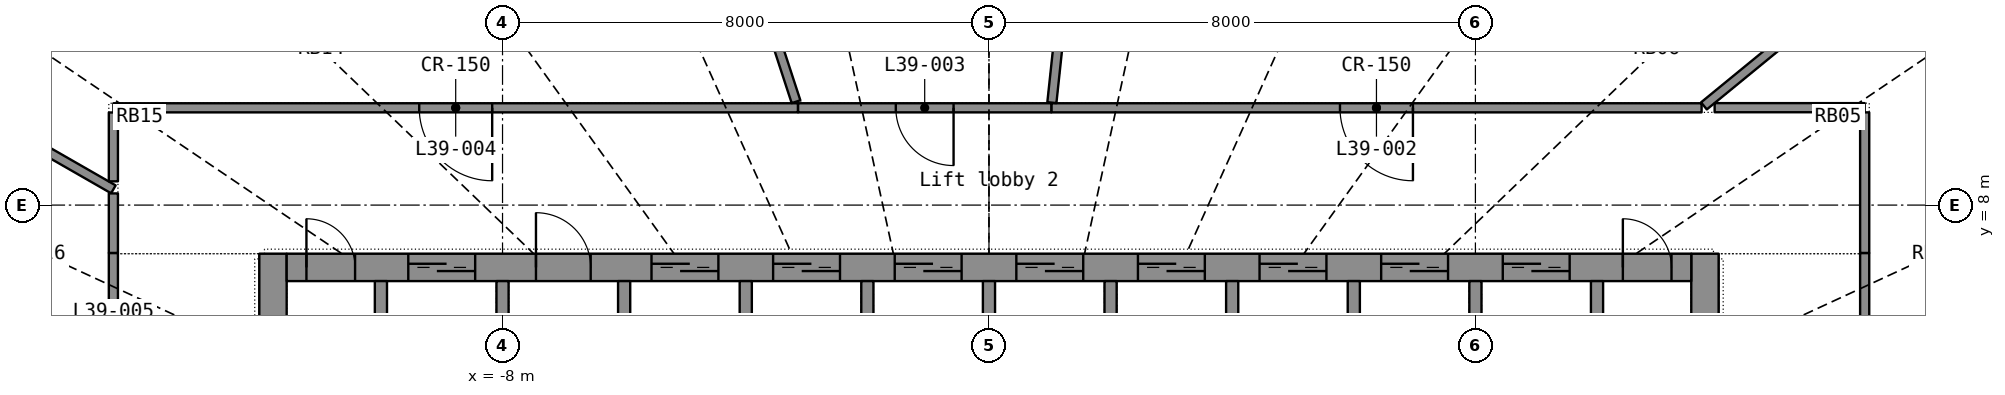
"""IFC4 building model, lengths in metres.
Left out: names, types, materials, properties, quantities, classifications, styles, units other than length and angle.
Written with IfcOpenShell. Run it as: python <this file> out.ifc"""

import sys

from ifc_helpers import new_model, si_unit, direction, frame, frame_2d, origin, place, context, subcontext, project, spatial, rectangle, extrude, element, fill, save


model = new_model("IFC4")
c1 = context("Model", 3, precision=1e-05, world=origin(), true_north=direction((0.0, 1.0)))
c2 = subcontext(c1, "Body", "Model", "MODEL_VIEW")
j1 = project(units=[si_unit("LENGTHUNIT", "METRE"), si_unit("PLANEANGLEUNIT", "RADIAN")], contexts=[c1])
p1 = place(None, origin())
s1 = spatial("IfcSite", under=j1, at=p1, CompositionType="ELEMENT")
p2 = place(p1, origin())
s2 = spatial("IfcBuilding", under=s1, at=p2, CompositionType="ELEMENT")
p3 = place(p2, frame((0.0, 0.0, 164.5)))
s3 = spatial("IfcBuildingStorey", under=s2, at=p3, CompositionType="ELEMENT", Elevation=164.5)
p4 = place(p3, frame((-11.775, -7.2, 0.0), z_axis=(0.0, 0.0, 1.0), x_axis=(0.0, 1.0, 0.0)))
e1 = element("IfcWall", 1, at=p4, inside=s3, PredefinedType="SHEAR", context=c2, shape_type="SweptSolid", body=[
    extrude(rectangle(XDim=14.4, YDim=0.45, at=frame_2d((7.2, 0.0))), origin(), (0.0, 0.0, 1.0), 3.3),
])
p5 = place(p4, frame((6.5, 0.0, 0.0)))
e2 = element("IfcOpeningElement", 2, at=p5, cuts=e1, PredefinedType="OPENING", context=c2, shape_type="SweptSolid", body=[
    extrude(rectangle(XDim=1.4, YDim=2.2, at=frame_2d((0.7, 1.1))), frame((0.0, 0.235, 0.0), z_axis=(0.0, -1.0, 0.0), x_axis=(1.0, 0.0, 0.0)), (0.0, 0.0, 1.0), 0.47),
])
p6 = place(p3, frame((11.775, -7.2, 0.0), z_axis=(0.0, 0.0, 1.0), x_axis=(0.0, 1.0, 0.0)))
e3 = element("IfcWall", 3, at=p6, inside=s3, PredefinedType="SHEAR", context=c2, shape_type="SweptSolid", body=[
    extrude(rectangle(XDim=14.4, YDim=0.45, at=frame_2d((7.2, 0.0))), origin(), (0.0, 0.0, 1.0), 3.3),
])
p7 = place(p6, frame((6.5, 0.0, 0.0)))
e4 = element("IfcOpeningElement", 4, at=p7, cuts=e3, PredefinedType="OPENING", context=c2, shape_type="SweptSolid", body=[
    extrude(rectangle(XDim=1.4, YDim=2.2, at=frame_2d((0.7, 1.1))), frame((0.0, 0.235, 0.0), z_axis=(0.0, -1.0, 0.0), x_axis=(1.0, 0.0, 0.0)), (0.0, 0.0, 1.0), 0.47),
])
p8 = place(p3, frame((-11.55, 6.975, 0.0), z_axis=(0.0, 0.0, 1.0), x_axis=(1.0, 0.0, 0.0)))
e5 = element("IfcWall", 5, at=p8, inside=s3, PredefinedType="SHEAR", context=c2, shape_type="SweptSolid", body=[
    extrude(rectangle(XDim=23.1, YDim=0.45, at=frame_2d((11.55, 0.0))), origin(), (0.0, 0.0, 1.0), 3.3),
])
p9 = place(p8, frame((2.0, 0.0, 0.0)))
e6 = element("IfcOpeningElement", 6, at=p9, cuts=e5, PredefinedType="OPENING", context=c2, shape_type="SweptSolid", body=[
    extrude(rectangle(XDim=1.1, YDim=2.2, at=frame_2d((0.55, 1.1))), frame((0.0, 0.235, 0.0), z_axis=(0.0, -1.0, 0.0), x_axis=(1.0, 0.0, 0.0)), (0.0, 0.0, 1.0), 0.47),
])
p10 = place(p8, frame((6.0, 0.0, 0.0)))
e7 = element("IfcOpeningElement", 7, at=p10, cuts=e5, PredefinedType="OPENING", context=c2, shape_type="SweptSolid", body=[
    extrude(rectangle(XDim=1.1, YDim=2.2, at=frame_2d((0.55, 1.1))), frame((0.0, 0.235, 0.0), z_axis=(0.0, -1.0, 0.0), x_axis=(1.0, 0.0, 0.0)), (0.0, 0.0, 1.0), 0.47),
])
p11 = place(p8, frame((8.0, 0.0, 0.0)))
e8 = element("IfcOpeningElement", 8, at=p11, cuts=e5, PredefinedType="OPENING", context=c2, shape_type="SweptSolid", body=[
    extrude(rectangle(XDim=1.1, YDim=2.2, at=frame_2d((0.55, 1.1))), frame((0.0, 0.235, 0.0), z_axis=(0.0, -1.0, 0.0), x_axis=(1.0, 0.0, 0.0)), (0.0, 0.0, 1.0), 0.47),
])
p12 = place(p8, frame((10.0, 0.0, 0.0)))
e9 = element("IfcOpeningElement", 9, at=p12, cuts=e5, PredefinedType="OPENING", context=c2, shape_type="SweptSolid", body=[
    extrude(rectangle(XDim=1.1, YDim=2.2, at=frame_2d((0.55, 1.1))), frame((0.0, 0.235, 0.0), z_axis=(0.0, -1.0, 0.0), x_axis=(1.0, 0.0, 0.0)), (0.0, 0.0, 1.0), 0.47),
])
p13 = place(p8, frame((12.0, 0.0, 0.0)))
e10 = element("IfcOpeningElement", 10, at=p13, cuts=e5, PredefinedType="OPENING", context=c2, shape_type="SweptSolid", body=[
    extrude(rectangle(XDim=1.1, YDim=2.2, at=frame_2d((0.55, 1.1))), frame((0.0, 0.235, 0.0), z_axis=(0.0, -1.0, 0.0), x_axis=(1.0, 0.0, 0.0)), (0.0, 0.0, 1.0), 0.47),
])
p14 = place(p8, frame((14.0, 0.0, 0.0)))
e11 = element("IfcOpeningElement", 11, at=p14, cuts=e5, PredefinedType="OPENING", context=c2, shape_type="SweptSolid", body=[
    extrude(rectangle(XDim=1.1, YDim=2.2, at=frame_2d((0.55, 1.1))), frame((0.0, 0.235, 0.0), z_axis=(0.0, -1.0, 0.0), x_axis=(1.0, 0.0, 0.0)), (0.0, 0.0, 1.0), 0.47),
])
p15 = place(p8, frame((16.0, 0.0, 0.0)))
e12 = element("IfcOpeningElement", 12, at=p15, cuts=e5, PredefinedType="OPENING", context=c2, shape_type="SweptSolid", body=[
    extrude(rectangle(XDim=1.1, YDim=2.2, at=frame_2d((0.55, 1.1))), frame((0.0, 0.235, 0.0), z_axis=(0.0, -1.0, 0.0), x_axis=(1.0, 0.0, 0.0)), (0.0, 0.0, 1.0), 0.47),
])
p16 = place(p8, frame((18.0, 0.0, 0.0)))
e13 = element("IfcOpeningElement", 13, at=p16, cuts=e5, PredefinedType="OPENING", context=c2, shape_type="SweptSolid", body=[
    extrude(rectangle(XDim=1.1, YDim=2.2, at=frame_2d((0.55, 1.1))), frame((0.0, 0.235, 0.0), z_axis=(0.0, -1.0, 0.0), x_axis=(1.0, 0.0, 0.0)), (0.0, 0.0, 1.0), 0.47),
])
p17 = place(p8, frame((20.0, 0.0, 0.0)))
e14 = element("IfcOpeningElement", 14, at=p17, cuts=e5, PredefinedType="OPENING", context=c2, shape_type="SweptSolid", body=[
    extrude(rectangle(XDim=1.1, YDim=2.2, at=frame_2d((0.55, 1.1))), frame((0.0, 0.235, 0.0), z_axis=(0.0, -1.0, 0.0), x_axis=(1.0, 0.0, 0.0)), (0.0, 0.0, 1.0), 0.47),
])
p18 = place(p8, frame((4.1, 0.0, 0.0)))
e15 = element("IfcOpeningElement", 15, at=p18, cuts=e5, PredefinedType="OPENING", context=c2, shape_type="SweptSolid", body=[
    extrude(rectangle(XDim=0.9, YDim=2.1, at=frame_2d((0.45, 1.05))), frame((0.0, 0.235, 0.0), z_axis=(0.0, -1.0, 0.0), x_axis=(1.0, 0.0, 0.0)), (0.0, 0.0, 1.0), 0.47),
])
p19 = place(p8, frame((0.325, 0.0, 0.0)))
e16 = element("IfcOpeningElement", 16, at=p19, cuts=e5, PredefinedType="OPENING", context=c2, shape_type="SweptSolid", body=[
    extrude(rectangle(XDim=0.8, YDim=2.05, at=frame_2d((0.4, 1.025))), frame((0.0, 0.235, 0.0), z_axis=(0.0, -1.0, 0.0), x_axis=(1.0, 0.0, 0.0)), (0.0, 0.0, 1.0), 0.47),
])
p20 = place(p8, frame((21.975, 0.0, 0.0)))
e17 = element("IfcOpeningElement", 17, at=p20, cuts=e5, PredefinedType="OPENING", context=c2, shape_type="SweptSolid", body=[
    extrude(rectangle(XDim=0.8, YDim=2.05, at=frame_2d((0.4, 1.025))), frame((0.0, 0.235, 0.0), z_axis=(0.0, -1.0, 0.0), x_axis=(1.0, 0.0, 0.0)), (0.0, 0.0, 1.0), 0.47),
])
for number, where, z_axis, x_axis in (
    (18, (-10.0, 3.9, 0.0), (0.0, 0.0, 1.0), (0.0, 1.0, 0.0)),
    (19, (-8.0, 3.9, 0.0), (0.0, 0.0, 1.0), (0.0, 1.0, 0.0)),
    (20, (-6.0, 3.9, 0.0), (0.0, 0.0, 1.0), (0.0, 1.0, 0.0)),
    (21, (-4.0, 3.9, 0.0), (0.0, 0.0, 1.0), (0.0, 1.0, 0.0)),
    (22, (-2.0, 3.9, 0.0), (0.0, 0.0, 1.0), (0.0, 1.0, 0.0)),
    (23, (0.0, 3.9, 0.0), (0.0, 0.0, 1.0), (0.0, 1.0, 0.0)),
    (24, (2.0, 3.9, 0.0), (0.0, 0.0, 1.0), (0.0, 1.0, 0.0)),
    (25, (4.0, 3.9, 0.0), (0.0, 0.0, 1.0), (0.0, 1.0, 0.0)),
    (26, (6.0, 3.9, 0.0), (0.0, 0.0, 1.0), (0.0, 1.0, 0.0)),
    (27, (8.0, 3.9, 0.0), (0.0, 0.0, 1.0), (0.0, 1.0, 0.0)),
    (28, (10.0, 3.9, 0.0), (0.0, 0.0, 1.0), (0.0, 1.0, 0.0)),
):
    element("IfcWall", number, at=place(p3, frame(where, z_axis=z_axis, x_axis=x_axis)), inside=s3, PredefinedType="SHEAR", context=c2, shape_type="SweptSolid", body=[
        extrude(rectangle(XDim=2.85, YDim=0.2, at=frame_2d((1.425, 0.0))), origin(), (0.0, 0.0, 1.0), 3.3),
    ])
p21 = place(p3, frame((-3.14, 9.6, 0.0), z_axis=(0.0, 0.0, 1.0), x_axis=(-1.0, 0.0, 0.0)))
e29 = element("IfcWall", 29, at=p21, inside=s3, PredefinedType="PARTITIONING", context=c2, shape_type="SweptSolid", body=[
    extrude(rectangle(XDim=11.26, YDim=0.15, at=frame_2d((5.63, 0.0))), origin(), (0.0, 0.0, 1.0), 2.4),
])
p22 = place(p21, frame((5.03, 0.0, 0.0)))
e30 = element("IfcOpeningElement", 30, at=p22, cuts=e29, PredefinedType="OPENING", context=c2, shape_type="SweptSolid", body=[
    extrude(rectangle(XDim=1.2, YDim=2.2, at=frame_2d((0.6, 1.1))), frame((0.0, 0.085, 0.0), z_axis=(0.0, -1.0, 0.0), x_axis=(1.0, 0.0, 0.0)), (0.0, 0.0, 1.0), 0.17),
])
p23 = place(p3, frame((11.72, 9.6, 0.0), z_axis=(0.0, 0.0, 1.0), x_axis=(-1.0, 0.0, 0.0)))
e31 = element("IfcWall", 31, at=p23, inside=s3, PredefinedType="PARTITIONING", context=c2, shape_type="SweptSolid", body=[
    extrude(rectangle(XDim=10.695, YDim=0.15, at=frame_2d((5.347, 0.0))), origin(), (0.0, 0.0, 1.0), 2.4),
])
p24 = place(p23, frame((4.747, 0.0, 0.0)))
e32 = element("IfcOpeningElement", 32, at=p24, cuts=e31, PredefinedType="OPENING", context=c2, shape_type="SweptSolid", body=[
    extrude(rectangle(XDim=1.2, YDim=2.2, at=frame_2d((0.6, 1.1))), frame((0.0, 0.085, 0.0), z_axis=(0.0, -1.0, 0.0), x_axis=(1.0, 0.0, 0.0)), (0.0, 0.0, 1.0), 0.17),
])
p25 = place(p3, frame((2.071, 19.393, 0.0), z_axis=(0.0, 0.0, 1.0), x_axis=(-0.106198491, -0.99434495, 0.0)))
e33 = element("IfcWall", 33, at=p25, inside=s3, PredefinedType="PARTITIONING", context=c2, shape_type="SweptSolid", body=[
    extrude(rectangle(XDim=9.763, YDim=0.15, at=frame_2d((4.882, 0.0))), origin(), (0.0, 0.0, 1.0), 2.4),
])
p26 = place(p3, frame((-6.152, 18.805, 0.0), z_axis=(0.0, 0.0, 1.0), x_axis=(0.310924377, -0.950434654, 0.0)))
e34 = element("IfcWall", 34, at=p26, inside=s3, PredefinedType="PARTITIONING", context=c2, shape_type="SweptSolid", body=[
    extrude(rectangle(XDim=9.58, YDim=0.15, at=frame_2d((4.79, 0.0))), origin(), (0.0, 0.0, 1.0), 2.4),
])
p27 = place(p3, frame((16.813, 13.772, 0.0), z_axis=(0.0, 0.0, 1.0), x_axis=(-0.773595956, -0.633679175, 0.0)))
e35 = element("IfcWall", 35, at=p27, inside=s3, PredefinedType="PARTITIONING", context=c2, shape_type="SweptSolid", body=[
    extrude(rectangle(XDim=6.535, YDim=0.15, at=frame_2d((3.267, 0.0))), origin(), (0.0, 0.0, 1.0), 2.4),
])
p28 = place(p3, frame((-19.483, 11.175, 0.0), z_axis=(0.0, 0.0, 1.0), x_axis=(0.867447243, -0.497529176, 0.0)))
e36 = element("IfcWall", 36, at=p28, inside=s3, PredefinedType="PARTITIONING", context=c2, shape_type="SweptSolid", body=[
    extrude(rectangle(XDim=5.86, YDim=0.15, at=frame_2d((2.93, 0.0))), origin(), (0.0, 0.0, 1.0), 2.4),
])
p29 = place(p3, frame((14.402, 1.579, 0.0), z_axis=(0.0, 0.0, 1.0), x_axis=(0.0, 1.0, 0.0)))
e37 = element("IfcWall", 37, at=p29, inside=s3, PredefinedType="PARTITIONING", context=c2, shape_type="SweptSolid", body=[
    extrude(rectangle(XDim=5.633, YDim=0.15, at=frame_2d((2.816, 0.0))), origin(), (0.0, 0.0, 1.0), 2.4),
])
p30 = place(p3, frame((1.025, 9.6, 0.0), z_axis=(0.0, 0.0, 1.0), x_axis=(-1.0, 0.0, 0.0)))
e38 = element("IfcWall", 38, at=p30, inside=s3, PredefinedType="PARTITIONING", context=c2, shape_type="SweptSolid", body=[
    extrude(rectangle(XDim=4.165, YDim=0.15, at=frame_2d((2.083, 0.0))), origin(), (0.0, 0.0, 1.0), 2.4),
])
p31 = place(p30, frame((1.607, 0.0, 0.0)))
e39 = element("IfcOpeningElement", 39, at=p31, cuts=e38, PredefinedType="OPENING", context=c2, shape_type="SweptSolid", body=[
    extrude(rectangle(XDim=0.95, YDim=2.15, at=frame_2d((0.475, 1.075))), frame((0.0, 0.085, 0.0), z_axis=(0.0, -1.0, 0.0), x_axis=(1.0, 0.0, 0.0)), (0.0, 0.0, 1.0), 0.17),
])
p32 = place(p3, frame((-14.4, 7.212, 0.0), z_axis=(0.0, 0.0, 1.0), x_axis=(0.0, -1.0, 0.0)))
e40 = element("IfcWall", 40, at=p32, inside=s3, PredefinedType="PARTITIONING", context=c2, shape_type="SweptSolid", body=[
    extrude(rectangle(XDim=3.956, YDim=0.15, at=frame_2d((1.978, 0.0))), origin(), (0.0, 0.0, 1.0), 2.4),
])
p33 = place(p32, frame((1.503, 0.0, 0.0)))
e41 = element("IfcOpeningElement", 41, at=p33, cuts=e40, PredefinedType="OPENING", context=c2, shape_type="SweptSolid", body=[
    extrude(rectangle(XDim=0.95, YDim=2.15, at=frame_2d((0.475, 1.075))), frame((0.0, 0.085, 0.0), z_axis=(0.0, -1.0, 0.0), x_axis=(1.0, 0.0, 0.0)), (0.0, 0.0, 1.0), 0.17),
])
p34 = place(p3, frame((14.402, 9.602, 0.0), z_axis=(0.0, 0.0, 1.0), x_axis=(-1.0, 0.0, 0.0)))
e42 = element("IfcWall", 42, at=p34, inside=s3, PredefinedType="PARTITIONING", context=c2, shape_type="SweptSolid", body=[
    extrude(rectangle(XDim=2.468, YDim=0.15, at=frame_2d((1.234, 0.0))), origin(), (0.0, 0.0, 1.0), 2.4),
])
p35 = place(p3, frame((14.402, 7.213, 0.0), z_axis=(0.0, 0.0, 1.0), x_axis=(0.0, 1.0, 0.0)))
e43 = element("IfcWall", 43, at=p35, inside=s3, PredefinedType="PARTITIONING", context=c2, shape_type="SweptSolid", body=[
    extrude(rectangle(XDim=2.312, YDim=0.15, at=frame_2d((1.156, 0.0))), origin(), (0.0, 0.0, 1.0), 2.4),
])
p36 = place(p3, frame((-14.4, 9.523, 0.0), z_axis=(0.0, 0.0, 1.0), x_axis=(0.0, -1.0, 0.0)))
e44 = element("IfcWall", 44, at=p36, inside=s3, PredefinedType="PARTITIONING", context=c2, shape_type="SweptSolid", body=[
    extrude(rectangle(XDim=1.132, YDim=0.15, at=frame_2d((0.566, 0.0))), origin(), (0.0, 0.0, 1.0), 2.4),
])
p37 = place(p3, frame((-14.4, 8.192, 0.0), z_axis=(0.0, 0.0, 1.0), x_axis=(0.0, -1.0, 0.0)))
e45 = element("IfcWall", 45, at=p37, inside=s3, PredefinedType="PARTITIONING", context=c2, shape_type="SweptSolid", body=[
    extrude(rectangle(XDim=0.979, YDim=0.15, at=frame_2d((0.49, 0.0))), origin(), (0.0, 0.0, 1.0), 2.4),
])
p38 = place(p9, origin())
e46 = element("IfcDoor", 46, at=p38, inside=s3, OperationType="DOUBLE_DOOR_SLIDING", PredefinedType="DOOR", context=c2, shape_type="SweptSolid", body=[
    extrude(rectangle(XDim=1.1, YDim=2.2, at=frame_2d((0.55, 1.1))), frame((0.0, 0.025, 0.0), z_axis=(0.0, -1.0, 0.0), x_axis=(1.0, 0.0, 0.0)), (0.0, 0.0, 1.0), 0.05),
])
fill(e6, e46)
p39 = place(p10, origin())
e47 = element("IfcDoor", 47, at=p39, inside=s3, OperationType="DOUBLE_DOOR_SLIDING", PredefinedType="DOOR", context=c2, shape_type="SweptSolid", body=[
    extrude(rectangle(XDim=1.1, YDim=2.2, at=frame_2d((0.55, 1.1))), frame((0.0, 0.025, 0.0), z_axis=(0.0, -1.0, 0.0), x_axis=(1.0, 0.0, 0.0)), (0.0, 0.0, 1.0), 0.05),
])
fill(e7, e47)
p40 = place(p11, origin())
e48 = element("IfcDoor", 48, at=p40, inside=s3, OperationType="DOUBLE_DOOR_SLIDING", PredefinedType="DOOR", context=c2, shape_type="SweptSolid", body=[
    extrude(rectangle(XDim=1.1, YDim=2.2, at=frame_2d((0.55, 1.1))), frame((0.0, 0.025, 0.0), z_axis=(0.0, -1.0, 0.0), x_axis=(1.0, 0.0, 0.0)), (0.0, 0.0, 1.0), 0.05),
])
fill(e8, e48)
p41 = place(p12, origin())
e49 = element("IfcDoor", 49, at=p41, inside=s3, OperationType="DOUBLE_DOOR_SLIDING", PredefinedType="DOOR", context=c2, shape_type="SweptSolid", body=[
    extrude(rectangle(XDim=1.1, YDim=2.2, at=frame_2d((0.55, 1.1))), frame((0.0, 0.025, 0.0), z_axis=(0.0, -1.0, 0.0), x_axis=(1.0, 0.0, 0.0)), (0.0, 0.0, 1.0), 0.05),
])
fill(e9, e49)
p42 = place(p13, origin())
e50 = element("IfcDoor", 50, at=p42, inside=s3, OperationType="DOUBLE_DOOR_SLIDING", PredefinedType="DOOR", context=c2, shape_type="SweptSolid", body=[
    extrude(rectangle(XDim=1.1, YDim=2.2, at=frame_2d((0.55, 1.1))), frame((0.0, 0.025, 0.0), z_axis=(0.0, -1.0, 0.0), x_axis=(1.0, 0.0, 0.0)), (0.0, 0.0, 1.0), 0.05),
])
fill(e10, e50)
p43 = place(p14, origin())
e51 = element("IfcDoor", 51, at=p43, inside=s3, OperationType="DOUBLE_DOOR_SLIDING", PredefinedType="DOOR", context=c2, shape_type="SweptSolid", body=[
    extrude(rectangle(XDim=1.1, YDim=2.2, at=frame_2d((0.55, 1.1))), frame((0.0, 0.025, 0.0), z_axis=(0.0, -1.0, 0.0), x_axis=(1.0, 0.0, 0.0)), (0.0, 0.0, 1.0), 0.05),
])
fill(e11, e51)
p44 = place(p15, origin())
e52 = element("IfcDoor", 52, at=p44, inside=s3, OperationType="DOUBLE_DOOR_SLIDING", PredefinedType="DOOR", context=c2, shape_type="SweptSolid", body=[
    extrude(rectangle(XDim=1.1, YDim=2.2, at=frame_2d((0.55, 1.1))), frame((0.0, 0.025, 0.0), z_axis=(0.0, -1.0, 0.0), x_axis=(1.0, 0.0, 0.0)), (0.0, 0.0, 1.0), 0.05),
])
fill(e12, e52)
p45 = place(p16, origin())
e53 = element("IfcDoor", 53, at=p45, inside=s3, OperationType="DOUBLE_DOOR_SLIDING", PredefinedType="DOOR", context=c2, shape_type="SweptSolid", body=[
    extrude(rectangle(XDim=1.1, YDim=2.2, at=frame_2d((0.55, 1.1))), frame((0.0, 0.025, 0.0), z_axis=(0.0, -1.0, 0.0), x_axis=(1.0, 0.0, 0.0)), (0.0, 0.0, 1.0), 0.05),
])
fill(e13, e53)
p46 = place(p17, origin())
e54 = element("IfcDoor", 54, at=p46, inside=s3, OperationType="DOUBLE_DOOR_SLIDING", PredefinedType="DOOR", context=c2, shape_type="SweptSolid", body=[
    extrude(rectangle(XDim=1.1, YDim=2.2, at=frame_2d((0.55, 1.1))), frame((0.0, 0.025, 0.0), z_axis=(0.0, -1.0, 0.0), x_axis=(1.0, 0.0, 0.0)), (0.0, 0.0, 1.0), 0.05),
])
fill(e14, e54)
p47 = place(p18, origin())
e55 = element("IfcDoor", 55, at=p47, inside=s3, OperationType="SINGLE_SWING_LEFT", PredefinedType="DOOR", context=c2, shape_type="SweptSolid", body=[
    extrude(rectangle(XDim=0.9, YDim=2.1, at=frame_2d((0.45, 1.05))), frame((0.0, 0.025, 0.0), z_axis=(0.0, -1.0, 0.0), x_axis=(1.0, 0.0, 0.0)), (0.0, 0.0, 1.0), 0.05),
])
fill(e15, e55)
p48 = place(p19, origin())
e56 = element("IfcDoor", 56, at=p48, inside=s3, OperationType="SINGLE_SWING_LEFT", PredefinedType="DOOR", context=c2, shape_type="SweptSolid", body=[
    extrude(rectangle(XDim=0.8, YDim=2.05, at=frame_2d((0.4, 1.025))), frame((0.0, 0.025, 0.0), z_axis=(0.0, -1.0, 0.0), x_axis=(1.0, 0.0, 0.0)), (0.0, 0.0, 1.0), 0.05),
])
fill(e16, e56)
p49 = place(p20, origin())
e57 = element("IfcDoor", 57, at=p49, inside=s3, OperationType="SINGLE_SWING_LEFT", PredefinedType="DOOR", context=c2, shape_type="SweptSolid", body=[
    extrude(rectangle(XDim=0.8, YDim=2.05, at=frame_2d((0.4, 1.025))), frame((0.0, 0.025, 0.0), z_axis=(0.0, -1.0, 0.0), x_axis=(1.0, 0.0, 0.0)), (0.0, 0.0, 1.0), 0.05),
])
fill(e17, e57)
p50 = place(p24, origin())
e58 = element("IfcDoor", 58, at=p50, inside=s3, OperationType="DOUBLE_DOOR_SINGLE_SWING", PredefinedType="DOOR", context=c2, shape_type="SweptSolid", body=[
    extrude(rectangle(XDim=1.2, YDim=2.2, at=frame_2d((0.6, 1.1))), frame((0.0, 0.025, 0.0), z_axis=(0.0, -1.0, 0.0), x_axis=(1.0, 0.0, 0.0)), (0.0, 0.0, 1.0), 0.05),
])
fill(e32, e58)
p51 = place(p31, origin())
e59 = element("IfcDoor", 59, at=p51, inside=s3, OperationType="SINGLE_SWING_LEFT", PredefinedType="DOOR", context=c2, shape_type="SweptSolid", body=[
    extrude(rectangle(XDim=0.95, YDim=2.15, at=frame_2d((0.475, 1.075))), frame((0.0, 0.025, 0.0), z_axis=(0.0, -1.0, 0.0), x_axis=(1.0, 0.0, 0.0)), (0.0, 0.0, 1.0), 0.05),
])
fill(e39, e59)
p52 = place(p22, origin())
e60 = element("IfcDoor", 60, at=p52, inside=s3, OperationType="DOUBLE_DOOR_SINGLE_SWING", PredefinedType="DOOR", context=c2, shape_type="SweptSolid", body=[
    extrude(rectangle(XDim=1.2, YDim=2.2, at=frame_2d((0.6, 1.1))), frame((0.0, 0.025, 0.0), z_axis=(0.0, -1.0, 0.0), x_axis=(1.0, 0.0, 0.0)), (0.0, 0.0, 1.0), 0.05),
])
fill(e30, e60)
save(model, sys.argv[1])
